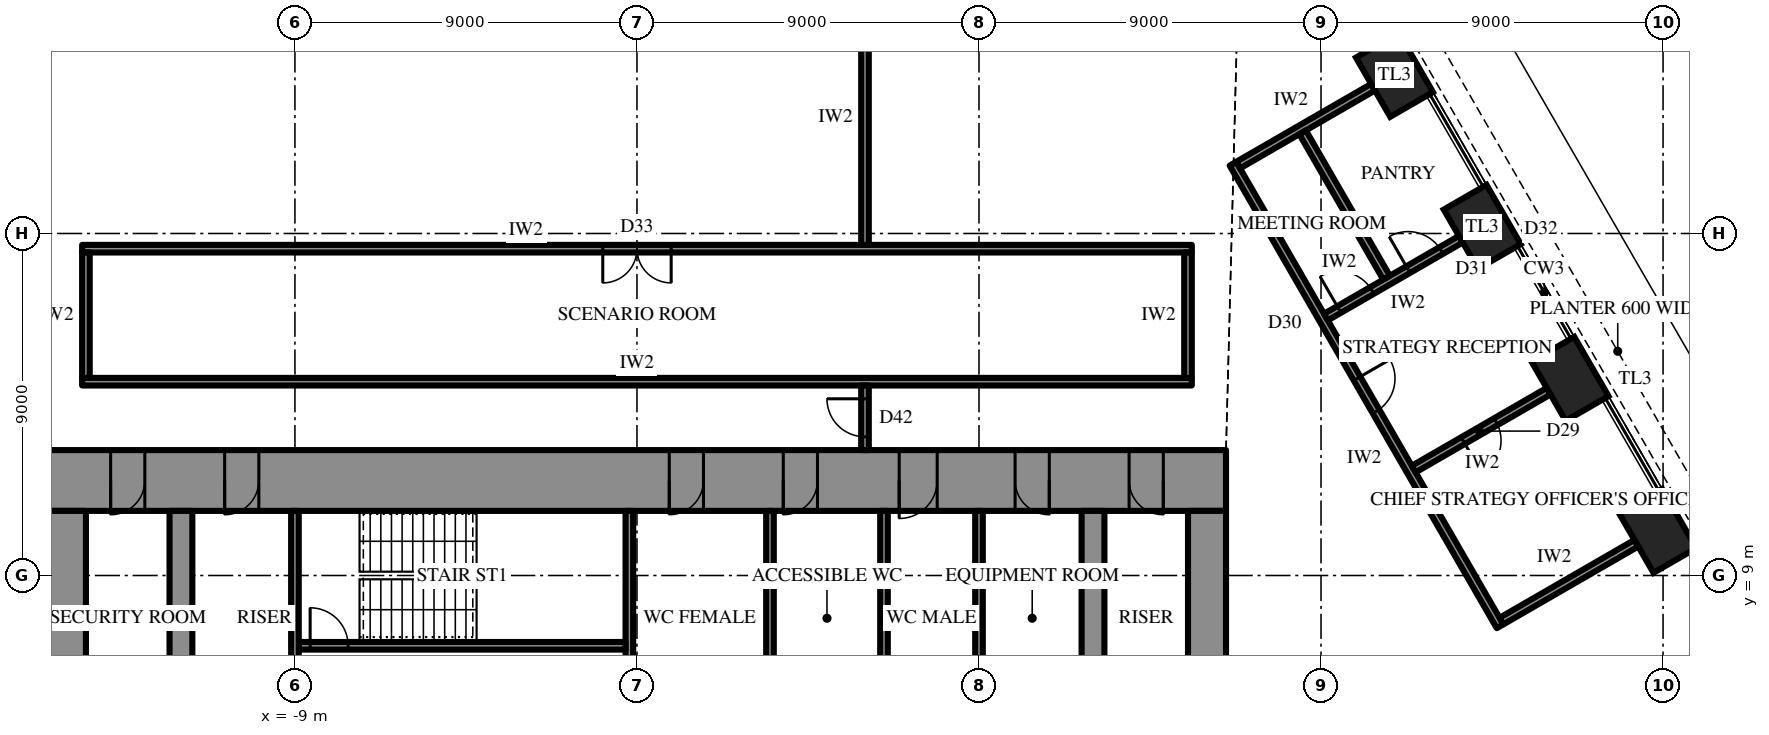
"""IFC4 building model, lengths in metres.
Left out: names, types, materials, properties, quantities, classifications, styles, units other than length and angle.
Written with IfcOpenShell. Run it as: python <this file> out.ifc"""

import sys

from ifc_helpers import new_model, si_unit, direction, frame, frame_2d, origin, origin_2d, place, context, subcontext, project, spatial, rectangle, extrude, element, fill, save


model = new_model("IFC4")
c1 = context("Model", 3, precision=1e-05, world=origin(), true_north=direction((0.0, 1.0)))
c2 = subcontext(c1, "Body", "Model", "MODEL_VIEW")
j1 = project(units=[si_unit("LENGTHUNIT", "METRE"), si_unit("PLANEANGLEUNIT", "RADIAN")], contexts=[c1])
p1 = place(None, origin())
s1 = spatial("IfcSite", under=j1, at=p1, CompositionType="ELEMENT")
p2 = place(p1, origin())
s2 = spatial("IfcBuilding", under=s1, at=p2, CompositionType="ELEMENT")
p3 = place(p2, frame((0.0, 0.0, 295.3)))
s3 = spatial("IfcBuildingStorey", under=s2, at=p3, CompositionType="ELEMENT", Elevation=295.3)
for number, where, z_axis, x_axis in (
    (1, (26.861, 10.175, 0.0), (0.0, 0.0, 1.0), (-0.5, 0.866, 0.0)),
    (2, (24.552, 14.175, 0.0), (0.0, 0.0, 1.0), (-0.5, 0.866, 0.0)),
    (3, (22.242, 18.175, 0.0), (0.0, 0.0, 1.0), (-0.5, 0.866, 0.0)),
    (4, (19.933, 22.175, 0.0), (0.0, 0.0, 1.0), (-0.5, 0.866, 0.0)),
):
    element("IfcColumn", number, at=place(p3, frame(where, z_axis=z_axis, x_axis=x_axis)), inside=s3, PredefinedType="COLUMN", context=c2, shape_type="SweptSolid", body=[
        extrude(rectangle(XDim=1.8, YDim=1.3, at=origin_2d()), origin(), (0.0, 0.0, 1.0), 4.2),
    ])
p4 = place(p3, frame((-15.5, 11.5, 0.0), z_axis=(0.0, 0.0, 1.0), x_axis=(1.0, 0.0, 0.0)))
e5 = element("IfcWall", 5, at=p4, inside=s3, PredefinedType="SHEAR", context=c2, shape_type="SweptSolid", body=[
    extrude(rectangle(XDim=31.0, YDim=1.6, at=frame_2d((15.5, 0.0))), origin(), (0.0, 0.0, 1.0), 4.2),
])
p5 = place(p4, frame((16.35, 0.0, 0.0)))
e6 = element("IfcOpeningElement", 6, at=p5, cuts=e5, PredefinedType="OPENING", context=c2, shape_type="SweptSolid", body=[
    extrude(rectangle(XDim=0.9, YDim=2.2, at=frame_2d((0.45, 1.1))), frame((0.0, 0.81, 0.0), z_axis=(0.0, -1.0, 0.0), x_axis=(1.0, 0.0, 0.0)), (0.0, 0.0, 1.0), 1.62),
])
p6 = place(p4, frame((19.35, 0.0, 0.0)))
e7 = element("IfcOpeningElement", 7, at=p6, cuts=e5, PredefinedType="OPENING", context=c2, shape_type="SweptSolid", body=[
    extrude(rectangle(XDim=0.9, YDim=2.2, at=frame_2d((0.45, 1.1))), frame((0.0, 0.81, 0.0), z_axis=(0.0, -1.0, 0.0), x_axis=(1.0, 0.0, 0.0)), (0.0, 0.0, 1.0), 1.62),
])
p7 = place(p4, frame((22.4, 0.0, 0.0)))
e8 = element("IfcOpeningElement", 8, at=p7, cuts=e5, PredefinedType="OPENING", context=c2, shape_type="SweptSolid", body=[
    extrude(rectangle(XDim=1.0, YDim=2.2, at=frame_2d((0.5, 1.1))), frame((0.0, 0.81, 0.0), z_axis=(0.0, -1.0, 0.0), x_axis=(1.0, 0.0, 0.0)), (0.0, 0.0, 1.0), 1.62),
])
p8 = place(p4, frame((1.65, 0.0, 0.0)))
e9 = element("IfcOpeningElement", 9, at=p8, cuts=e5, PredefinedType="OPENING", context=c2, shape_type="SweptSolid", body=[
    extrude(rectangle(XDim=0.9, YDim=2.2, at=frame_2d((0.45, 1.1))), frame((0.0, 0.81, 0.0), z_axis=(0.0, -1.0, 0.0), x_axis=(1.0, 0.0, 0.0)), (0.0, 0.0, 1.0), 1.62),
])
p9 = place(p4, frame((4.65, 0.0, 0.0)))
e10 = element("IfcOpeningElement", 10, at=p9, cuts=e5, PredefinedType="OPENING", context=c2, shape_type="SweptSolid", body=[
    extrude(rectangle(XDim=0.9, YDim=2.2, at=frame_2d((0.45, 1.1))), frame((0.0, 0.81, 0.0), z_axis=(0.0, -1.0, 0.0), x_axis=(1.0, 0.0, 0.0)), (0.0, 0.0, 1.0), 1.62),
])
p10 = place(p4, frame((25.45, 0.0, 0.0)))
e11 = element("IfcOpeningElement", 11, at=p10, cuts=e5, PredefinedType="OPENING", context=c2, shape_type="SweptSolid", body=[
    extrude(rectangle(XDim=0.9, YDim=2.2, at=frame_2d((0.45, 1.1))), frame((0.0, 0.81, 0.0), z_axis=(0.0, -1.0, 0.0), x_axis=(1.0, 0.0, 0.0)), (0.0, 0.0, 1.0), 1.62),
])
p11 = place(p4, frame((28.45, 0.0, 0.0)))
e12 = element("IfcOpeningElement", 12, at=p11, cuts=e5, PredefinedType="OPENING", context=c2, shape_type="SweptSolid", body=[
    extrude(rectangle(XDim=0.9, YDim=2.2, at=frame_2d((0.45, 1.1))), frame((0.0, 0.81, 0.0), z_axis=(0.0, -1.0, 0.0), x_axis=(1.0, 0.0, 0.0)), (0.0, 0.0, 1.0), 1.62),
])
p12 = place(p3, frame((15.0, -10.7, 0.0), z_axis=(0.0, 0.0, 1.0), x_axis=(0.0, 1.0, 0.0)))
e13 = element("IfcWall", 13, at=p12, inside=s3, PredefinedType="SHEAR", context=c2, shape_type="SweptSolid", body=[
    extrude(rectangle(XDim=21.4, YDim=1.0, at=frame_2d((10.7, 0.0))), origin(), (0.0, 0.0, 1.0), 4.2),
])
p13 = place(p12, frame((9.8, 0.0, 0.0)))
e14 = element("IfcOpeningElement", 14, at=p13, cuts=e13, PredefinedType="OPENING", context=c2, shape_type="SweptSolid", body=[
    extrude(rectangle(XDim=1.8, YDim=2.4, at=frame_2d((0.9, 1.2))), frame((0.0, 0.51, 0.0), z_axis=(0.0, -1.0, 0.0), x_axis=(1.0, 0.0, 0.0)), (0.0, 0.0, 1.0), 1.02),
])
p14 = place(p3, frame((-15.0, 10.7, 0.0), z_axis=(0.0, 0.0, 1.0), x_axis=(0.0, -1.0, 0.0)))
e15 = element("IfcWall", 15, at=p14, inside=s3, PredefinedType="SHEAR", context=c2, shape_type="SweptSolid", body=[
    extrude(rectangle(XDim=21.4, YDim=1.0, at=frame_2d((10.7, 0.0))), origin(), (0.0, 0.0, 1.0), 4.2),
])
p15 = place(p14, frame((9.8, 0.0, 0.0)))
e16 = element("IfcOpeningElement", 16, at=p15, cuts=e15, PredefinedType="OPENING", context=c2, shape_type="SweptSolid", body=[
    extrude(rectangle(XDim=1.8, YDim=2.4, at=frame_2d((0.9, 1.2))), frame((0.0, 0.51, 0.0), z_axis=(0.0, -1.0, 0.0), x_axis=(1.0, 0.0, 0.0)), (0.0, 0.0, 1.0), 1.02),
])
p16 = place(p3, frame((12.0, -10.7, 0.0), z_axis=(0.0, 0.0, 1.0), x_axis=(0.0, 1.0, 0.0)))
e17 = element("IfcWall", 17, at=p16, inside=s3, PredefinedType="SHEAR", context=c2, shape_type="SweptSolid", body=[
    extrude(rectangle(XDim=21.4, YDim=0.6, at=frame_2d((10.7, 0.0))), origin(), (0.0, 0.0, 1.0), 4.2),
])
p17 = place(p16, frame((9.8, 0.0, 0.0)))
e18 = element("IfcOpeningElement", 18, at=p17, cuts=e17, PredefinedType="OPENING", context=c2, shape_type="SweptSolid", body=[
    extrude(rectangle(XDim=1.8, YDim=2.4, at=frame_2d((0.9, 1.2))), frame((0.0, 0.31, 0.0), z_axis=(0.0, -1.0, 0.0), x_axis=(1.0, 0.0, 0.0)), (0.0, 0.0, 1.0), 0.62),
])
p18 = place(p3, frame((-12.0, -10.7, 0.0), z_axis=(0.0, 0.0, 1.0), x_axis=(0.0, 1.0, 0.0)))
e19 = element("IfcWall", 19, at=p18, inside=s3, PredefinedType="SHEAR", context=c2, shape_type="SweptSolid", body=[
    extrude(rectangle(XDim=21.4, YDim=0.6, at=frame_2d((10.7, 0.0))), origin(), (0.0, 0.0, 1.0), 4.2),
])
p19 = place(p18, frame((9.8, 0.0, 0.0)))
e20 = element("IfcOpeningElement", 20, at=p19, cuts=e19, PredefinedType="OPENING", context=c2, shape_type="SweptSolid", body=[
    extrude(rectangle(XDim=1.8, YDim=2.4, at=frame_2d((0.9, 1.2))), frame((0.0, 0.31, 0.0), z_axis=(0.0, -1.0, 0.0), x_axis=(1.0, 0.0, 0.0)), (0.0, 0.0, 1.0), 0.62),
])
p20 = place(p3, frame((-0.2, 5.05, 0.0), z_axis=(0.0, 0.0, 1.0), x_axis=(0.0, 1.0, 0.0)))
e21 = element("IfcWall", 21, at=p20, inside=s3, PredefinedType="SHEAR", context=c2, shape_type="SweptSolid", body=[
    extrude(rectangle(XDim=5.65, YDim=0.2, at=frame_2d((2.825, 0.0))), origin(), (0.0, 0.0, 1.0), 4.2),
])
p21 = place(p3, frame((-8.9, 7.15, 0.0), z_axis=(0.0, 0.0, 1.0), x_axis=(1.0, 0.0, 0.0)))
e22 = element("IfcWall", 22, at=p21, inside=s3, PredefinedType="SHEAR", context=c2, shape_type="SweptSolid", body=[
    extrude(rectangle(XDim=8.6, YDim=0.2, at=frame_2d((4.3, 0.0))), origin(), (0.0, 0.0, 1.0), 4.2),
])
p22 = place(p21, frame((0.3, 0.0, 0.0)))
e23 = element("IfcOpeningElement", 23, at=p22, cuts=e22, PredefinedType="OPENING", context=c2, shape_type="SweptSolid", body=[
    extrude(rectangle(XDim=1.0, YDim=2.2, at=frame_2d((0.5, 1.1))), frame((0.0, 0.11, 0.0), z_axis=(0.0, -1.0, 0.0), x_axis=(1.0, 0.0, 0.0)), (0.0, 0.0, 1.0), 0.22),
])
for number, where, z_axis, x_axis in (
    (24, (-9.0, 5.05, 0.0), (0.0, 0.0, 1.0), (0.0, 1.0, 0.0)),
    (25, (9.0, 5.05, 0.0), (0.0, 0.0, 1.0), (0.0, 1.0, 0.0)),
    (26, (3.5, 5.05, 0.0), (0.0, 0.0, 1.0), (0.0, 1.0, 0.0)),
    (27, (6.5, 5.05, 0.0), (0.0, 0.0, 1.0), (0.0, 1.0, 0.0)),
):
    element("IfcWall", number, at=place(p3, frame(where, z_axis=z_axis, x_axis=x_axis)), inside=s3, PredefinedType="PARTITIONING", context=c2, shape_type="SweptSolid", body=[
        extrude(rectangle(XDim=5.65, YDim=0.2, at=frame_2d((2.825, 0.0))), origin(), (0.0, 0.0, 1.0), 3.9),
    ])
p23 = place(p3, frame((-14.6, 14.1, 0.0), z_axis=(0.0, 0.0, 1.0), x_axis=(1.0, 0.0, 0.0)))
e28 = element("IfcWall", 28, at=p23, inside=s3, PredefinedType="PARTITIONING", context=c2, shape_type="SweptSolid", body=[
    extrude(rectangle(XDim=29.2, YDim=0.2, at=frame_2d((14.6, 0.0))), origin(), (0.0, 0.0, 1.0), 3.9),
])
p24 = place(p3, frame((-14.6, 17.6, 0.0), z_axis=(0.0, 0.0, 1.0), x_axis=(1.0, 0.0, 0.0)))
e29 = element("IfcWall", 29, at=p24, inside=s3, PredefinedType="PARTITIONING", context=c2, shape_type="SweptSolid", body=[
    extrude(rectangle(XDim=29.2, YDim=0.2, at=frame_2d((14.6, 0.0))), origin(), (0.0, 0.0, 1.0), 3.9),
])
p25 = place(p24, frame((13.7, 0.0, 0.0)))
e30 = element("IfcOpeningElement", 30, at=p25, cuts=e29, PredefinedType="OPENING", context=c2, shape_type="SweptSolid", body=[
    extrude(rectangle(XDim=1.8, YDim=2.4, at=frame_2d((0.9, 1.2))), frame((0.0, 0.11, 0.0), z_axis=(0.0, -1.0, 0.0), x_axis=(1.0, 0.0, 0.0)), (0.0, 0.0, 1.0), 0.22),
])
for number, where, z_axis, x_axis in (
    (31, (-14.5, 14.2, 0.0), (0.0, 0.0, 1.0), (0.0, 1.0, 0.0)),
    (32, (14.5, 14.2, 0.0), (0.0, 0.0, 1.0), (0.0, 1.0, 0.0)),
):
    element("IfcWall", number, at=place(p3, frame(where, z_axis=z_axis, x_axis=x_axis)), inside=s3, PredefinedType="PARTITIONING", context=c2, shape_type="SweptSolid", body=[
        extrude(rectangle(XDim=3.3, YDim=0.2, at=frame_2d((1.65, 0.0))), origin(), (0.0, 0.0, 1.0), 3.9),
    ])
p26 = place(p3, frame((22.711, 7.663, 0.0), z_axis=(0.0, 0.0, 1.0), x_axis=(-0.499989069193, 0.866031714597, 0.0)))
e33 = element("IfcWall", 33, at=p26, inside=s3, PredefinedType="PARTITIONING", context=c2, shape_type="SweptSolid", body=[
    extrude(rectangle(XDim=14.056, YDim=0.2, at=frame_2d((7.028, 0.0))), origin(), (0.0, 0.0, 1.0), 3.9),
])
p27 = place(p26, frame((6.528, 0.0, 0.0)))
e34 = element("IfcOpeningElement", 34, at=p27, cuts=e33, PredefinedType="OPENING", context=c2, shape_type="SweptSolid", body=[
    extrude(rectangle(XDim=1.0, YDim=2.2, at=frame_2d((0.5, 1.1))), frame((0.0, 0.11, 0.0), z_axis=(0.0, -1.0, 0.0), x_axis=(1.0, 0.0, 0.0)), (0.0, 0.0, 1.0), 0.22),
])
p28 = place(p3, frame((22.748, 7.8, 0.0), z_axis=(0.0, 0.0, 1.0), x_axis=(0.8660249478, 0.500000789788, 0.0)))
e35 = element("IfcWall", 35, at=p28, inside=s3, PredefinedType="PARTITIONING", context=c2, shape_type="SweptSolid", body=[
    extrude(rectangle(XDim=4.1, YDim=0.2, at=frame_2d((2.05, 0.0))), origin(), (0.0, 0.0, 1.0), 2.892),
])
p29 = place(p3, frame((20.438, 11.8, 0.0), z_axis=(0.0, 0.0, 1.0), x_axis=(0.8660249478, 0.500000789788, 0.0)))
e36 = element("IfcWall", 36, at=p29, inside=s3, PredefinedType="PARTITIONING", context=c2, shape_type="SweptSolid", body=[
    extrude(rectangle(XDim=4.1, YDim=0.2, at=frame_2d((2.05, 0.0))), origin(), (0.0, 0.0, 1.0), 2.892),
])
p30 = place(p29, frame((1.5, 0.0, 0.0)))
e37 = element("IfcOpeningElement", 37, at=p30, cuts=e36, PredefinedType="OPENING", context=c2, shape_type="SweptSolid", body=[
    extrude(rectangle(XDim=1.0, YDim=2.2, at=frame_2d((0.5, 1.1))), frame((0.0, 0.11, 0.0), z_axis=(0.0, -1.0, 0.0), x_axis=(1.0, 0.0, 0.0)), (0.0, 0.0, 1.0), 0.22),
])
p31 = place(p3, frame((18.129, 15.8, 0.0), z_axis=(0.0, 0.0, 1.0), x_axis=(0.866010060309, 0.500026574738, 0.0)))
e38 = element("IfcWall", 38, at=p31, inside=s3, PredefinedType="PARTITIONING", context=c2, shape_type="SweptSolid", body=[
    extrude(rectangle(XDim=4.1, YDim=0.2, at=frame_2d((2.05, 0.0))), origin(), (0.0, 0.0, 1.0), 2.892),
])
p32 = place(p31, frame((0.4, 0.0, 0.0)))
e39 = element("IfcOpeningElement", 39, at=p32, cuts=e38, PredefinedType="OPENING", context=c2, shape_type="SweptSolid", body=[
    extrude(rectangle(XDim=1.0, YDim=2.2, at=frame_2d((0.5, 1.1))), frame((0.0, 0.11, 0.0), z_axis=(0.0, -1.0, 0.0), x_axis=(1.0, 0.0, 0.0)), (0.0, 0.0, 1.0), 0.22),
])
p33 = place(p31, frame((2.5, 0.0, 0.0)))
e40 = element("IfcOpeningElement", 40, at=p33, cuts=e38, PredefinedType="OPENING", context=c2, shape_type="SweptSolid", body=[
    extrude(rectangle(XDim=1.0, YDim=2.2, at=frame_2d((0.5, 1.1))), frame((0.0, 0.11, 0.0), z_axis=(0.0, -1.0, 0.0), x_axis=(1.0, 0.0, 0.0)), (0.0, 0.0, 1.0), 0.22),
])
p34 = place(p3, frame((15.819, 19.8, 0.0), z_axis=(0.0, 0.0, 1.0), x_axis=(0.8660249478, 0.500000789788, 0.0)))
e41 = element("IfcWall", 41, at=p34, inside=s3, PredefinedType="PARTITIONING", context=c2, shape_type="SweptSolid", body=[
    extrude(rectangle(XDim=4.1, YDim=0.2, at=frame_2d((2.05, 0.0))), origin(), (0.0, 0.0, 1.0), 2.892),
])
p35 = place(p3, frame((19.724, 16.837, 0.0), z_axis=(0.0, 0.0, 1.0), x_axis=(-0.500025355245, 0.866010764432, 0.0)))
e42 = element("IfcWall", 42, at=p35, inside=s3, PredefinedType="PARTITIONING", context=c2, shape_type="SweptSolid", body=[
    extrude(rectangle(XDim=4.419, YDim=0.2, at=frame_2d((2.209, 0.0))), origin(), (0.0, 0.0, 1.0), 3.9),
])
p36 = place(p3, frame((6.0, 12.3, 0.0), z_axis=(0.0, 0.0, 1.0), x_axis=(0.0, 1.0, 0.0)))
e43 = element("IfcWall", 43, at=p36, inside=s3, PredefinedType="PARTITIONING", context=c2, shape_type="SweptSolid", body=[
    extrude(rectangle(XDim=1.7, YDim=0.2, at=frame_2d((0.85, 0.0))), origin(), (0.0, 0.0, 1.0), 3.9),
])
p37 = place(p36, frame((0.35, 0.0, 0.0)))
e44 = element("IfcOpeningElement", 44, at=p37, cuts=e43, PredefinedType="OPENING", context=c2, shape_type="SweptSolid", body=[
    extrude(rectangle(XDim=1.0, YDim=2.2, at=frame_2d((0.5, 1.1))), frame((0.0, 0.11, 0.0), z_axis=(0.0, -1.0, 0.0), x_axis=(1.0, 0.0, 0.0)), (0.0, 0.0, 1.0), 0.22),
])
p38 = place(p3, frame((6.0, 17.7, 0.0), z_axis=(0.0, 0.0, 1.0), x_axis=(0.0, 1.0, 0.0)))
e45 = element("IfcWall", 45, at=p38, inside=s3, PredefinedType="PARTITIONING", context=c2, shape_type="SweptSolid", body=[
    extrude(rectangle(XDim=6.7, YDim=0.2, at=frame_2d((3.35, 0.0))), origin(), (0.0, 0.0, 1.0), 3.9),
])
p39 = place(p22, origin())
e46 = element("IfcDoor", 46, at=p39, inside=s3, OperationType="SINGLE_SWING_RIGHT", PredefinedType="DOOR", context=c2, shape_type="SweptSolid", body=[
    extrude(rectangle(XDim=1.0, YDim=2.2, at=frame_2d((0.5, 1.1))), frame((0.0, 0.025, 0.0), z_axis=(0.0, -1.0, 0.0), x_axis=(1.0, 0.0, 0.0)), (0.0, 0.0, 1.0), 0.05),
])
fill(e23, e46)
p40 = place(p5, frame((0.9, 0.0, 0.0), z_axis=(0.0, 0.0, 1.0), x_axis=(-1.0, 0.0, 0.0)))
e47 = element("IfcDoor", 47, at=p40, inside=s3, OperationType="SINGLE_SWING_LEFT", PredefinedType="DOOR", context=c2, shape_type="SweptSolid", body=[
    extrude(rectangle(XDim=0.9, YDim=2.2, at=frame_2d((0.45, 1.1))), frame((0.0, 0.025, 0.0), z_axis=(0.0, -1.0, 0.0), x_axis=(1.0, 0.0, 0.0)), (0.0, 0.0, 1.0), 0.05),
])
fill(e6, e47)
p41 = place(p6, frame((0.9, 0.0, 0.0), z_axis=(0.0, 0.0, 1.0), x_axis=(-1.0, 0.0, 0.0)))
e48 = element("IfcDoor", 48, at=p41, inside=s3, OperationType="SINGLE_SWING_LEFT", PredefinedType="DOOR", context=c2, shape_type="SweptSolid", body=[
    extrude(rectangle(XDim=0.9, YDim=2.2, at=frame_2d((0.45, 1.1))), frame((0.0, 0.025, 0.0), z_axis=(0.0, -1.0, 0.0), x_axis=(1.0, 0.0, 0.0)), (0.0, 0.0, 1.0), 0.05),
])
fill(e7, e48)
p42 = place(p7, frame((1.0, 0.0, 0.0), z_axis=(0.0, 0.0, 1.0), x_axis=(-1.0, 0.0, 0.0)))
e49 = element("IfcDoor", 49, at=p42, inside=s3, OperationType="SINGLE_SWING_LEFT", PredefinedType="DOOR", context=c2, shape_type="SweptSolid", body=[
    extrude(rectangle(XDim=1.0, YDim=2.2, at=frame_2d((0.5, 1.1))), frame((0.0, 0.025, 0.0), z_axis=(0.0, -1.0, 0.0), x_axis=(1.0, 0.0, 0.0)), (0.0, 0.0, 1.0), 0.05),
])
fill(e8, e49)
p43 = place(p8, frame((0.9, 0.0, 0.0), z_axis=(0.0, 0.0, 1.0), x_axis=(-1.0, 0.0, 0.0)))
e50 = element("IfcDoor", 50, at=p43, inside=s3, OperationType="SINGLE_SWING_LEFT", PredefinedType="DOOR", context=c2, shape_type="SweptSolid", body=[
    extrude(rectangle(XDim=0.9, YDim=2.2, at=frame_2d((0.45, 1.1))), frame((0.0, 0.025, 0.0), z_axis=(0.0, -1.0, 0.0), x_axis=(1.0, 0.0, 0.0)), (0.0, 0.0, 1.0), 0.05),
])
fill(e9, e50)
p44 = place(p9, frame((0.9, 0.0, 0.0), z_axis=(0.0, 0.0, 1.0), x_axis=(-1.0, 0.0, 0.0)))
e51 = element("IfcDoor", 51, at=p44, inside=s3, OperationType="SINGLE_SWING_LEFT", PredefinedType="DOOR", context=c2, shape_type="SweptSolid", body=[
    extrude(rectangle(XDim=0.9, YDim=2.2, at=frame_2d((0.45, 1.1))), frame((0.0, 0.025, 0.0), z_axis=(0.0, -1.0, 0.0), x_axis=(1.0, 0.0, 0.0)), (0.0, 0.0, 1.0), 0.05),
])
fill(e10, e51)
p45 = place(p10, frame((0.9, 0.0, 0.0), z_axis=(0.0, 0.0, 1.0), x_axis=(-1.0, 0.0, 0.0)))
e52 = element("IfcDoor", 52, at=p45, inside=s3, OperationType="SINGLE_SWING_RIGHT", PredefinedType="DOOR", context=c2, shape_type="SweptSolid", body=[
    extrude(rectangle(XDim=0.9, YDim=2.2, at=frame_2d((0.45, 1.1))), frame((0.0, 0.025, 0.0), z_axis=(0.0, -1.0, 0.0), x_axis=(1.0, 0.0, 0.0)), (0.0, 0.0, 1.0), 0.05),
])
fill(e11, e52)
p46 = place(p11, frame((0.9, 0.0, 0.0), z_axis=(0.0, 0.0, 1.0), x_axis=(-1.0, 0.0, 0.0)))
e53 = element("IfcDoor", 53, at=p46, inside=s3, OperationType="SINGLE_SWING_RIGHT", PredefinedType="DOOR", context=c2, shape_type="SweptSolid", body=[
    extrude(rectangle(XDim=0.9, YDim=2.2, at=frame_2d((0.45, 1.1))), frame((0.0, 0.025, 0.0), z_axis=(0.0, -1.0, 0.0), x_axis=(1.0, 0.0, 0.0)), (0.0, 0.0, 1.0), 0.05),
])
fill(e12, e53)
p47 = place(p25, frame((1.8, 0.0, 0.0), z_axis=(0.0, 0.0, 1.0), x_axis=(-1.0, 0.0, 0.0)))
e54 = element("IfcDoor", 54, at=p47, inside=s3, OperationType="DOUBLE_DOOR_SINGLE_SWING", PredefinedType="DOOR", context=c2, shape_type="SweptSolid", body=[
    extrude(rectangle(XDim=1.8, YDim=2.4, at=frame_2d((0.9, 1.2))), frame((0.0, 0.025, 0.0), z_axis=(0.0, -1.0, 0.0), x_axis=(1.0, 0.0, 0.0)), (0.0, 0.0, 1.0), 0.05),
])
fill(e30, e54)
p48 = place(p30, frame((1.0, 0.0, 0.0), z_axis=(0.0, 0.0, 1.0), x_axis=(-1.0, 0.0, 0.0)))
e55 = element("IfcDoor", 55, at=p48, inside=s3, OperationType="SINGLE_SWING_LEFT", PredefinedType="DOOR", context=c2, shape_type="SweptSolid", body=[
    extrude(rectangle(XDim=1.0, YDim=2.2, at=frame_2d((0.5, 1.1))), frame((0.0, 0.025, 0.0), z_axis=(0.0, -1.0, 0.0), x_axis=(1.0, 0.0, 0.0)), (0.0, 0.0, 1.0), 0.05),
])
fill(e37, e55)
p49 = place(p27, frame((1.0, 0.0, 0.0), z_axis=(0.0, 0.0, 1.0), x_axis=(-1.0, 0.0, 0.0)))
e56 = element("IfcDoor", 56, at=p49, inside=s3, OperationType="SINGLE_SWING_RIGHT", PredefinedType="DOOR", context=c2, shape_type="SweptSolid", body=[
    extrude(rectangle(XDim=1.0, YDim=2.2, at=frame_2d((0.5, 1.1))), frame((0.0, 0.025, 0.0), z_axis=(0.0, -1.0, 0.0), x_axis=(1.0, 0.0, 0.0)), (0.0, 0.0, 1.0), 0.05),
])
fill(e34, e56)
p50 = place(p32, origin())
e57 = element("IfcDoor", 57, at=p50, inside=s3, OperationType="SINGLE_SWING_RIGHT", PredefinedType="DOOR", context=c2, shape_type="SweptSolid", body=[
    extrude(rectangle(XDim=1.0, YDim=2.2, at=frame_2d((0.5, 1.1))), frame((0.0, 0.025, 0.0), z_axis=(0.0, -1.0, 0.0), x_axis=(1.0, 0.0, 0.0)), (0.0, 0.0, 1.0), 0.05),
])
fill(e39, e57)
p51 = place(p33, origin())
e58 = element("IfcDoor", 58, at=p51, inside=s3, OperationType="SINGLE_SWING_RIGHT", PredefinedType="DOOR", context=c2, shape_type="SweptSolid", body=[
    extrude(rectangle(XDim=1.0, YDim=2.2, at=frame_2d((0.5, 1.1))), frame((0.0, 0.025, 0.0), z_axis=(0.0, -1.0, 0.0), x_axis=(1.0, 0.0, 0.0)), (0.0, 0.0, 1.0), 0.05),
])
fill(e40, e58)
p52 = place(p37, origin())
e59 = element("IfcDoor", 59, at=p52, inside=s3, OperationType="SINGLE_SWING_LEFT", PredefinedType="DOOR", context=c2, shape_type="SweptSolid", body=[
    extrude(rectangle(XDim=1.0, YDim=2.2, at=frame_2d((0.5, 1.1))), frame((0.0, 0.025, 0.0), z_axis=(0.0, -1.0, 0.0), x_axis=(1.0, 0.0, 0.0)), (0.0, 0.0, 1.0), 0.05),
])
fill(e44, e59)
save(model, sys.argv[1])
